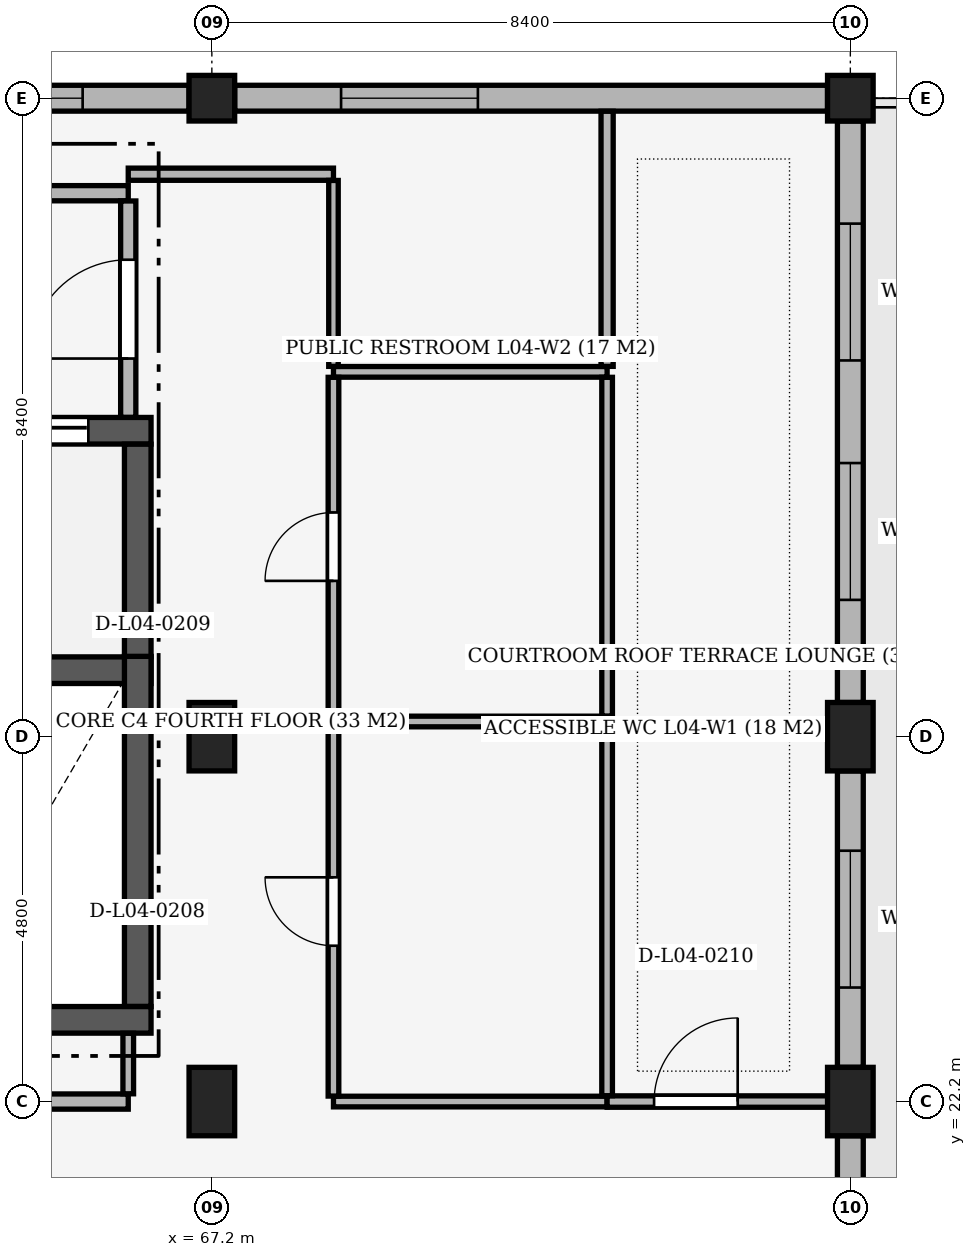
"""IFC4 building model, lengths in metres.
Left out: names, types, materials, properties, quantities, classifications, styles, units other than length and angle.
Written with IfcOpenShell. Run it as: python <this file> out.ifc"""

import sys

from ifc_helpers import new_model, si_unit, direction, frame, frame_2d, origin, origin_2d, place, context, subcontext, project, spatial, rectangle, extrude, element, fill, save


model = new_model("IFC4")
c1 = context("Model", 3, precision=1e-05, world=origin(), true_north=direction((0.0, 1.0)))
c2 = subcontext(c1, "Body", "Model", "MODEL_VIEW")
j1 = project(units=[si_unit("LENGTHUNIT", "METRE"), si_unit("PLANEANGLEUNIT", "RADIAN")], contexts=[c1])
p1 = place(None, origin())
s1 = spatial("IfcSite", under=j1, at=p1, CompositionType="ELEMENT")
p2 = place(p1, origin())
s2 = spatial("IfcBuilding", under=s1, at=p2, CompositionType="ELEMENT")
p3 = place(p2, frame((0.0, 0.0, 20.4)))
s3 = spatial("IfcBuildingStorey", under=s2, at=p3, CompositionType="ELEMENT", Elevation=20.4)
for number, where, z_axis, x_axis in (
    (1, (67.2, 22.2, 0.0), (0.0, 0.0, 1.0), (1.0, 0.0, 0.0)),
    (2, (67.2, 27.0, 0.0), (0.0, 0.0, 1.0), (1.0, 0.0, 0.0)),
):
    element("IfcColumn", number, at=place(p3, frame(where, z_axis=z_axis, x_axis=x_axis)), inside=s3, PredefinedType="COLUMN", context=c2, shape_type="SweptSolid", body=[
        extrude(rectangle(XDim=0.6, YDim=0.9, at=origin_2d()), origin(), (0.0, 0.0, 1.0), 4.8),
    ])
p4 = place(p3, frame((67.2, 35.4, 0.0), z_axis=(0.0, 0.0, 1.0), x_axis=(1.0, 0.0, 0.0)))
e3 = element("IfcColumn", 3, at=p4, inside=s3, PredefinedType="COLUMN", context=c2, shape_type="SweptSolid", body=[
    extrude(rectangle(XDim=0.6, YDim=0.6, at=origin_2d()), origin(), (0.0, 0.0, 1.0), 4.8),
])
for number, where, z_axis, x_axis in (
    (4, (75.6, 22.2, 0.0), (0.0, 0.0, 1.0), (1.0, 0.0, 0.0)),
    (5, (75.6, 27.0, 0.0), (0.0, 0.0, 1.0), (1.0, 0.0, 0.0)),
):
    element("IfcColumn", number, at=place(p3, frame(where, z_axis=z_axis, x_axis=x_axis)), inside=s3, PredefinedType="COLUMN", context=c2, shape_type="SweptSolid", body=[
        extrude(rectangle(XDim=0.6, YDim=0.9, at=origin_2d()), origin(), (0.0, 0.0, 1.0), 4.8),
    ])
p5 = place(p3, frame((75.6, 35.4, 0.0), z_axis=(0.0, 0.0, 1.0), x_axis=(1.0, 0.0, 0.0)))
e6 = element("IfcColumn", 6, at=p5, inside=s3, PredefinedType="COLUMN", context=c2, shape_type="SweptSolid", body=[
    extrude(rectangle(XDim=0.6, YDim=0.6, at=origin_2d()), origin(), (0.0, 0.0, 1.0), 4.8),
])
p6 = place(p3, frame((59.1, 35.4, 0.0), z_axis=(0.0, 0.0, 1.0), x_axis=(1.0, 0.0, 0.0)))
e7 = element("IfcWall", 7, at=p6, inside=s3, PredefinedType="SOLIDWALL", context=c2, shape_type="SweptSolid", body=[
    extrude(rectangle(XDim=7.8, YDim=0.34, at=frame_2d((3.9, 0.0))), origin(), (0.0, 0.0, 1.0), 3.85),
])
p7 = place(p6, frame((1.4, 0.0, 0.85)))
e8 = element("IfcOpeningElement", 8, at=p7, cuts=e7, PredefinedType="OPENING", context=c2, shape_type="SweptSolid", body=[
    extrude(rectangle(XDim=1.8, YDim=2.4, at=frame_2d((0.9, 1.2))), frame((0.0, 0.185, 0.0), z_axis=(0.0, -1.0, 0.0), x_axis=(1.0, 0.0, 0.0)), (0.0, 0.0, 1.0), 0.37),
])
p8 = place(p6, frame((4.6, 0.0, 0.85)))
e9 = element("IfcOpeningElement", 9, at=p8, cuts=e7, PredefinedType="OPENING", context=c2, shape_type="SweptSolid", body=[
    extrude(rectangle(XDim=1.8, YDim=2.4, at=frame_2d((0.9, 1.2))), frame((0.0, 0.185, 0.0), z_axis=(0.0, -1.0, 0.0), x_axis=(1.0, 0.0, 0.0)), (0.0, 0.0, 1.0), 0.37),
])
p9 = place(p3, frame((67.5, 35.4, 0.0), z_axis=(0.0, 0.0, 1.0), x_axis=(1.0, 0.0, 0.0)))
e10 = element("IfcWall", 10, at=p9, inside=s3, PredefinedType="SOLIDWALL", context=c2, shape_type="SweptSolid", body=[
    extrude(rectangle(XDim=7.8, YDim=0.34, at=frame_2d((3.9, 0.0))), origin(), (0.0, 0.0, 1.0), 3.85),
])
p10 = place(p9, frame((1.4, 0.0, 0.85)))
e11 = element("IfcOpeningElement", 11, at=p10, cuts=e10, PredefinedType="OPENING", context=c2, shape_type="SweptSolid", body=[
    extrude(rectangle(XDim=1.8, YDim=2.4, at=frame_2d((0.9, 1.2))), frame((0.0, 0.185, 0.0), z_axis=(0.0, -1.0, 0.0), x_axis=(1.0, 0.0, 0.0)), (0.0, 0.0, 1.0), 0.37),
])
p11 = place(p3, frame((75.6, 35.1, 0.0), z_axis=(0.0, 0.0, 1.0), x_axis=(0.0, -1.0, 0.0)))
e12 = element("IfcWall", 12, at=p11, inside=s3, PredefinedType="SOLIDWALL", context=c2, shape_type="SweptSolid", body=[
    extrude(rectangle(XDim=7.65, YDim=0.34, at=frame_2d((3.825, 0.0))), origin(), (0.0, 0.0, 1.0), 3.85),
])
p12 = place(p11, frame((1.35, 0.0, 0.85)))
e13 = element("IfcOpeningElement", 13, at=p12, cuts=e12, PredefinedType="OPENING", context=c2, shape_type="SweptSolid", body=[
    extrude(rectangle(XDim=1.8, YDim=2.4, at=frame_2d((0.9, 1.2))), frame((0.0, 0.185, 0.0), z_axis=(0.0, -1.0, 0.0), x_axis=(1.0, 0.0, 0.0)), (0.0, 0.0, 1.0), 0.37),
])
p13 = place(p11, frame((4.5, 0.0, 0.85)))
e14 = element("IfcOpeningElement", 14, at=p13, cuts=e12, PredefinedType="OPENING", context=c2, shape_type="SweptSolid", body=[
    extrude(rectangle(XDim=1.8, YDim=2.4, at=frame_2d((0.9, 1.2))), frame((0.0, 0.185, 0.0), z_axis=(0.0, -1.0, 0.0), x_axis=(1.0, 0.0, 0.0)), (0.0, 0.0, 1.0), 0.37),
])
p14 = place(p3, frame((75.6, 26.55, 0.0), z_axis=(0.0, 0.0, 1.0), x_axis=(0.0, -1.0, 0.0)))
e15 = element("IfcWall", 15, at=p14, inside=s3, PredefinedType="SOLIDWALL", context=c2, shape_type="SweptSolid", body=[
    extrude(rectangle(XDim=3.9, YDim=0.34, at=frame_2d((1.95, 0.0))), origin(), (0.0, 0.0, 1.0), 4.0),
])
p15 = place(p14, frame((1.05, 0.0, 0.85)))
e16 = element("IfcOpeningElement", 16, at=p15, cuts=e15, PredefinedType="OPENING", context=c2, shape_type="SweptSolid", body=[
    extrude(rectangle(XDim=1.8, YDim=2.4, at=frame_2d((0.9, 1.2))), frame((0.0, 0.185, 0.0), z_axis=(0.0, -1.0, 0.0), x_axis=(1.0, 0.0, 0.0)), (0.0, 0.0, 1.0), 0.37),
])
p16 = place(p3, frame((75.6, 21.75, 0.0), z_axis=(0.0, 0.0, 1.0), x_axis=(0.0, -1.0, 0.0)))
e17 = element("IfcWall", 17, at=p16, inside=s3, PredefinedType="SOLIDWALL", context=c2, shape_type="SweptSolid", body=[
    extrude(rectangle(XDim=15.9, YDim=0.34, at=frame_2d((7.95, 0.0))), origin(), (0.0, 0.0, 1.0), 3.5),
])
p17 = place(p16, frame((7.05, 0.0, 0.0)))
e18 = element("IfcOpeningElement", 18, at=p17, cuts=e17, PredefinedType="OPENING", context=c2, shape_type="SweptSolid", body=[
    extrude(rectangle(XDim=1.8, YDim=2.2, at=frame_2d((0.9, 1.1))), frame((0.0, 0.185, 0.0), z_axis=(0.0, -1.0, 0.0), x_axis=(1.0, 0.0, 0.0)), (0.0, 0.0, 1.0), 0.37),
])
p18 = place(p3, frame((63.552, 27.875, 0.0), z_axis=(0.0, 0.0, 1.0), x_axis=(1.0, 0.0, 0.0)))
e19 = element("IfcWall", 19, at=p18, inside=s3, PredefinedType="SHEAR", context=c2, shape_type="SweptSolid", body=[
    extrude(rectangle(XDim=2.848, YDim=0.35, at=frame_2d((1.424, 0.0))), origin(), (0.0, 0.0, 1.0), 4.55),
])
p19 = place(p3, frame((63.55, 31.025, 0.0), z_axis=(0.0, 0.0, 1.0), x_axis=(1.0, 0.0, 0.0)))
e20 = element("IfcWall", 20, at=p19, inside=s3, PredefinedType="SHEAR", context=c2, shape_type="SweptSolid", body=[
    extrude(rectangle(XDim=2.85, YDim=0.35, at=frame_2d((1.425, 0.0))), origin(), (0.0, 0.0, 1.0), 4.55),
])
p20 = place(p19, frame((0.825, 0.0, 0.0)))
e21 = element("IfcOpeningElement", 21, at=p20, cuts=e20, PredefinedType="OPENING", context=c2, shape_type="SweptSolid", body=[
    extrude(rectangle(XDim=1.2, YDim=2.15, at=frame_2d((0.6, 1.075))), frame((0.0, 0.19, 0.0), z_axis=(0.0, -1.0, 0.0), x_axis=(1.0, 0.0, 0.0)), (0.0, 0.0, 1.0), 0.38),
])
p21 = place(p3, frame((66.225, 28.052, 0.0), z_axis=(0.0, 0.0, 1.0), x_axis=(0.0, 1.0, 0.0)))
e22 = element("IfcWall", 22, at=p21, inside=s3, PredefinedType="SHEAR", context=c2, shape_type="SweptSolid", body=[
    extrude(rectangle(XDim=2.796, YDim=0.35, at=frame_2d((1.398, 0.0))), origin(), (0.0, 0.0, 1.0), 4.55),
])
p22 = place(p3, frame((63.55, 23.275, 0.0), z_axis=(0.0, 0.0, 1.0), x_axis=(1.0, 0.0, 0.0)))
e23 = element("IfcWall", 23, at=p22, inside=s3, PredefinedType="SHEAR", context=c2, shape_type="SweptSolid", body=[
    extrude(rectangle(XDim=2.85, YDim=0.35, at=frame_2d((1.425, 0.0))), origin(), (0.0, 0.0, 1.0), 4.55),
])
p23 = place(p3, frame((66.225, 23.452, 0.0), z_axis=(0.0, 0.0, 1.0), x_axis=(0.0, 1.0, 0.0)))
e24 = element("IfcWall", 24, at=p23, inside=s3, PredefinedType="SHEAR", context=c2, shape_type="SweptSolid", body=[
    extrude(rectangle(XDim=4.605, YDim=0.35, at=frame_2d((2.302, 0.0))), origin(), (0.0, 0.0, 1.0), 4.55),
])
p24 = place(p3, frame((59.3, 22.2, 0.0), z_axis=(0.0, 0.0, 1.0), x_axis=(1.0, 0.0, 0.0)))
e25 = element("IfcWall", 25, at=p24, inside=s3, PredefinedType="PARTITIONING", context=c2, shape_type="SweptSolid", body=[
    extrude(rectangle(XDim=6.8, YDim=0.2, at=frame_2d((3.4, 0.0))), origin(), (0.0, 0.0, 1.0), 3.85),
])
p25 = place(p3, frame((68.8, 22.2, 0.0), z_axis=(0.0, 0.0, 1.0), x_axis=(1.0, 0.0, 0.0)))
e26 = element("IfcWall", 26, at=p25, inside=s3, PredefinedType="PARTITIONING", context=c2, shape_type="SweptSolid", body=[
    extrude(rectangle(XDim=3.6, YDim=0.14, at=frame_2d((1.8, 0.0))), origin(), (0.0, 0.0, 1.0), 3.85),
])
p26 = place(p3, frame((72.4, 22.2, 0.0), z_axis=(0.0, 0.0, 1.0), x_axis=(1.0, 0.0, 0.0)))
e27 = element("IfcWall", 27, at=p26, inside=s3, PredefinedType="PARTITIONING", context=c2, shape_type="SweptSolid", body=[
    extrude(rectangle(XDim=3.237, YDim=0.15, at=frame_2d((1.619, 0.0))), origin(), (0.0, 0.0, 1.0), 3.85),
])
p27 = place(p26, frame((0.618, 0.0, 0.0)))
e28 = element("IfcOpeningElement", 28, at=p27, cuts=e27, PredefinedType="OPENING", context=c2, shape_type="SweptSolid", body=[
    extrude(rectangle(XDim=1.1, YDim=2.1, at=frame_2d((0.55, 1.05))), frame((0.0, 0.09, 0.0), z_axis=(0.0, -1.0, 0.0), x_axis=(1.0, 0.0, 0.0)), (0.0, 0.0, 1.0), 0.18),
])
p28 = place(p3, frame((68.8, 27.2, 0.0), z_axis=(0.0, 0.0, 1.0), x_axis=(1.0, 0.0, 0.0)))
e29 = element("IfcWall", 29, at=p28, inside=s3, PredefinedType="PARTITIONING", context=c2, shape_type="SweptSolid", body=[
    extrude(rectangle(XDim=3.6, YDim=0.14, at=frame_2d((1.8, 0.0))), origin(), (0.0, 0.0, 1.0), 3.85),
])
p29 = place(p3, frame((68.8, 31.8, 0.0), z_axis=(0.0, 0.0, 1.0), x_axis=(1.0, 0.0, 0.0)))
e30 = element("IfcWall", 30, at=p29, inside=s3, PredefinedType="PARTITIONING", context=c2, shape_type="SweptSolid", body=[
    extrude(rectangle(XDim=3.6, YDim=0.14, at=frame_2d((1.8, 0.0))), origin(), (0.0, 0.0, 1.0), 4.55),
])
p30 = place(p3, frame((59.9, 34.15, 0.0), z_axis=(0.0, 0.0, 1.0), x_axis=(1.0, 0.0, 0.0)))
e31 = element("IfcWall", 31, at=p30, inside=s3, PredefinedType="PARTITIONING", context=c2, shape_type="SweptSolid", body=[
    extrude(rectangle(XDim=6.2, YDim=0.2, at=frame_2d((3.1, 0.0))), origin(), (0.0, 0.0, 1.0), 4.55),
])
p31 = place(p3, frame((66.1, 34.4, 0.0), z_axis=(0.0, 0.0, 1.0), x_axis=(1.0, 0.0, 0.0)))
e32 = element("IfcWall", 32, at=p31, inside=s3, PredefinedType="PARTITIONING", context=c2, shape_type="SweptSolid", body=[
    extrude(rectangle(XDim=2.7, YDim=0.16, at=frame_2d((1.35, 0.0))), origin(), (0.0, 0.0, 1.0), 3.85),
])
p32 = place(p3, frame((66.1, 31.202, 0.0), z_axis=(0.0, 0.0, 1.0), x_axis=(0.0, 1.0, 0.0)))
e33 = element("IfcWall", 33, at=p32, inside=s3, PredefinedType="PARTITIONING", context=c2, shape_type="SweptSolid", body=[
    extrude(rectangle(XDim=2.846, YDim=0.2, at=frame_2d((1.423, 0.0))), origin(), (0.0, 0.0, 1.0), 4.25),
])
p33 = place(p32, frame((0.773, 0.0, 0.0)))
e34 = element("IfcOpeningElement", 34, at=p33, cuts=e33, PredefinedType="OPENING", context=c2, shape_type="SweptSolid", body=[
    extrude(rectangle(XDim=1.3, YDim=2.2, at=frame_2d((0.65, 1.1))), frame((0.0, 0.115, 0.0), z_axis=(0.0, -1.0, 0.0), x_axis=(1.0, 0.0, 0.0)), (0.0, 0.0, 1.0), 0.23),
])
p34 = place(p3, frame((66.1, 22.302, 0.0), z_axis=(0.0, 0.0, 1.0), x_axis=(0.0, 1.0, 0.0)))
e35 = element("IfcWall", 35, at=p34, inside=s3, PredefinedType="PARTITIONING", context=c2, shape_type="SweptSolid", body=[
    extrude(rectangle(XDim=0.796, YDim=0.14, at=frame_2d((0.398, 0.0))), origin(), (0.0, 0.0, 1.0), 3.85),
])
p35 = place(p3, frame((68.8, 31.872, 0.0), z_axis=(0.0, 0.0, 1.0), x_axis=(0.0, 1.0, 0.0)))
e36 = element("IfcWall", 36, at=p35, inside=s3, PredefinedType="PARTITIONING", context=c2, shape_type="SweptSolid", body=[
    extrude(rectangle(XDim=2.446, YDim=0.125, at=frame_2d((1.223, 0.0))), origin(), (0.0, 0.0, 1.0), 4.55),
])
p36 = place(p3, frame((68.8, 22.272, 0.0), z_axis=(0.0, 0.0, 1.0), x_axis=(0.0, 1.0, 0.0)))
e37 = element("IfcWall", 37, at=p36, inside=s3, PredefinedType="PARTITIONING", context=c2, shape_type="SweptSolid", body=[
    extrude(rectangle(XDim=4.856, YDim=0.14, at=frame_2d((2.428, 0.0))), origin(), (0.0, 0.0, 1.0), 3.85),
])
p37 = place(p36, frame((1.978, 0.0, 0.0)))
e38 = element("IfcOpeningElement", 38, at=p37, cuts=e37, PredefinedType="OPENING", context=c2, shape_type="SweptSolid", body=[
    extrude(rectangle(XDim=0.9, YDim=2.1, at=frame_2d((0.45, 1.05))), frame((0.0, 0.085, 0.0), z_axis=(0.0, -1.0, 0.0), x_axis=(1.0, 0.0, 0.0)), (0.0, 0.0, 1.0), 0.17),
])
p38 = place(p3, frame((68.8, 27.272, 0.0), z_axis=(0.0, 0.0, 1.0), x_axis=(0.0, 1.0, 0.0)))
e39 = element("IfcWall", 39, at=p38, inside=s3, PredefinedType="PARTITIONING", context=c2, shape_type="SweptSolid", body=[
    extrude(rectangle(XDim=4.456, YDim=0.14, at=frame_2d((2.228, 0.0))), origin(), (0.0, 0.0, 1.0), 3.85),
])
p39 = place(p38, frame((1.778, 0.0, 0.0)))
e40 = element("IfcOpeningElement", 40, at=p39, cuts=e39, PredefinedType="OPENING", context=c2, shape_type="SweptSolid", body=[
    extrude(rectangle(XDim=0.9, YDim=2.1, at=frame_2d((0.45, 1.05))), frame((0.0, 0.085, 0.0), z_axis=(0.0, -1.0, 0.0), x_axis=(1.0, 0.0, 0.0)), (0.0, 0.0, 1.0), 0.17),
])
p40 = place(p3, frame((72.4, 22.277, 0.0), z_axis=(0.0, 0.0, 1.0), x_axis=(0.0, 1.0, 0.0)))
e41 = element("IfcWall", 41, at=p40, inside=s3, PredefinedType="PARTITIONING", context=c2, shape_type="SweptSolid", body=[
    extrude(rectangle(XDim=4.851, YDim=0.14, at=frame_2d((2.425, 0.0))), origin(), (0.0, 0.0, 1.0), 3.85),
])
p41 = place(p3, frame((72.4, 27.272, 0.0), z_axis=(0.0, 0.0, 1.0), x_axis=(0.0, 1.0, 0.0)))
e42 = element("IfcWall", 42, at=p41, inside=s3, PredefinedType="PARTITIONING", context=c2, shape_type="SweptSolid", body=[
    extrude(rectangle(XDim=4.456, YDim=0.14, at=frame_2d((2.228, 0.0))), origin(), (0.0, 0.0, 1.0), 3.85),
])
p42 = place(p3, frame((72.4, 31.872, 0.0), z_axis=(0.0, 0.0, 1.0), x_axis=(0.0, 1.0, 0.0)))
e43 = element("IfcWall", 43, at=p42, inside=s3, PredefinedType="PARTITIONING", context=c2, shape_type="SweptSolid", body=[
    extrude(rectangle(XDim=3.356, YDim=0.16, at=frame_2d((1.678, 0.0))), origin(), (0.0, 0.0, 1.0), 3.85),
])
p43 = place(p8, origin())
e44 = element("IfcWindow", 44, at=p43, inside=s3, PartitioningType="SINGLE_PANEL", PredefinedType="WINDOW", context=c2, shape_type="SweptSolid", body=[
    extrude(rectangle(XDim=1.8, YDim=2.4, at=frame_2d((0.9, 1.2))), frame((0.0, 0.03, 0.0), z_axis=(0.0, -1.0, 0.0), x_axis=(1.0, 0.0, 0.0)), (0.0, 0.0, 1.0), 0.06),
])
fill(e9, e44)
p44 = place(p10, origin())
e45 = element("IfcWindow", 45, at=p44, inside=s3, PartitioningType="SINGLE_PANEL", PredefinedType="WINDOW", context=c2, shape_type="SweptSolid", body=[
    extrude(rectangle(XDim=1.8, YDim=2.4, at=frame_2d((0.9, 1.2))), frame((0.0, 0.03, 0.0), z_axis=(0.0, -1.0, 0.0), x_axis=(1.0, 0.0, 0.0)), (0.0, 0.0, 1.0), 0.06),
])
fill(e11, e45)
p45 = place(p12, origin())
e46 = element("IfcWindow", 46, at=p45, inside=s3, PartitioningType="SINGLE_PANEL", PredefinedType="WINDOW", context=c2, shape_type="SweptSolid", body=[
    extrude(rectangle(XDim=1.8, YDim=2.4, at=frame_2d((0.9, 1.2))), frame((0.0, 0.03, 0.0), z_axis=(0.0, -1.0, 0.0), x_axis=(1.0, 0.0, 0.0)), (0.0, 0.0, 1.0), 0.06),
])
fill(e13, e46)
p46 = place(p13, origin())
e47 = element("IfcWindow", 47, at=p46, inside=s3, PartitioningType="SINGLE_PANEL", PredefinedType="WINDOW", context=c2, shape_type="SweptSolid", body=[
    extrude(rectangle(XDim=1.8, YDim=2.4, at=frame_2d((0.9, 1.2))), frame((0.0, 0.03, 0.0), z_axis=(0.0, -1.0, 0.0), x_axis=(1.0, 0.0, 0.0)), (0.0, 0.0, 1.0), 0.06),
])
fill(e14, e47)
p47 = place(p15, origin())
e48 = element("IfcWindow", 48, at=p47, inside=s3, PartitioningType="SINGLE_PANEL", PredefinedType="WINDOW", context=c2, shape_type="SweptSolid", body=[
    extrude(rectangle(XDim=1.8, YDim=2.4, at=frame_2d((0.9, 1.2))), frame((0.0, 0.03, 0.0), z_axis=(0.0, -1.0, 0.0), x_axis=(1.0, 0.0, 0.0)), (0.0, 0.0, 1.0), 0.06),
])
fill(e16, e48)
p48 = place(p20, origin())
e49 = element("IfcDoor", 49, at=p48, inside=s3, OperationType="DOUBLE_DOOR_SLIDING", PredefinedType="DOOR", context=c2, shape_type="SweptSolid", body=[
    extrude(rectangle(XDim=1.2, YDim=2.15, at=frame_2d((0.6, 1.075))), frame((0.0, 0.025, 0.0), z_axis=(0.0, -1.0, 0.0), x_axis=(1.0, 0.0, 0.0)), (0.0, 0.0, 1.0), 0.05),
])
fill(e21, e49)
p49 = place(p33, origin())
e50 = element("IfcDoor", 50, at=p49, inside=s3, OperationType="SINGLE_SWING_LEFT", PredefinedType="DOOR", context=c2, shape_type="SweptSolid", body=[
    extrude(rectangle(XDim=1.3, YDim=2.2, at=frame_2d((0.65, 1.1))), frame((0.0, 0.025, 0.0), z_axis=(0.0, -1.0, 0.0), x_axis=(1.0, 0.0, 0.0)), (0.0, 0.0, 1.0), 0.05),
])
fill(e34, e50)
p50 = place(p37, origin())
e51 = element("IfcDoor", 51, at=p50, inside=s3, OperationType="SINGLE_SWING_RIGHT", PredefinedType="DOOR", context=c2, shape_type="SweptSolid", body=[
    extrude(rectangle(XDim=0.9, YDim=2.1, at=frame_2d((0.45, 1.05))), frame((0.0, 0.025, 0.0), z_axis=(0.0, -1.0, 0.0), x_axis=(1.0, 0.0, 0.0)), (0.0, 0.0, 1.0), 0.05),
])
fill(e38, e51)
p51 = place(p39, origin())
e52 = element("IfcDoor", 52, at=p51, inside=s3, OperationType="SINGLE_SWING_LEFT", PredefinedType="DOOR", context=c2, shape_type="SweptSolid", body=[
    extrude(rectangle(XDim=0.9, YDim=2.1, at=frame_2d((0.45, 1.05))), frame((0.0, 0.025, 0.0), z_axis=(0.0, -1.0, 0.0), x_axis=(1.0, 0.0, 0.0)), (0.0, 0.0, 1.0), 0.05),
])
fill(e40, e52)
p52 = place(p27, origin())
e53 = element("IfcDoor", 53, at=p52, inside=s3, OperationType="SINGLE_SWING_RIGHT", PredefinedType="DOOR", context=c2, shape_type="SweptSolid", body=[
    extrude(rectangle(XDim=1.1, YDim=2.1, at=frame_2d((0.55, 1.05))), frame((0.0, 0.025, 0.0), z_axis=(0.0, -1.0, 0.0), x_axis=(1.0, 0.0, 0.0)), (0.0, 0.0, 1.0), 0.05),
])
fill(e28, e53)
save(model, sys.argv[1])
